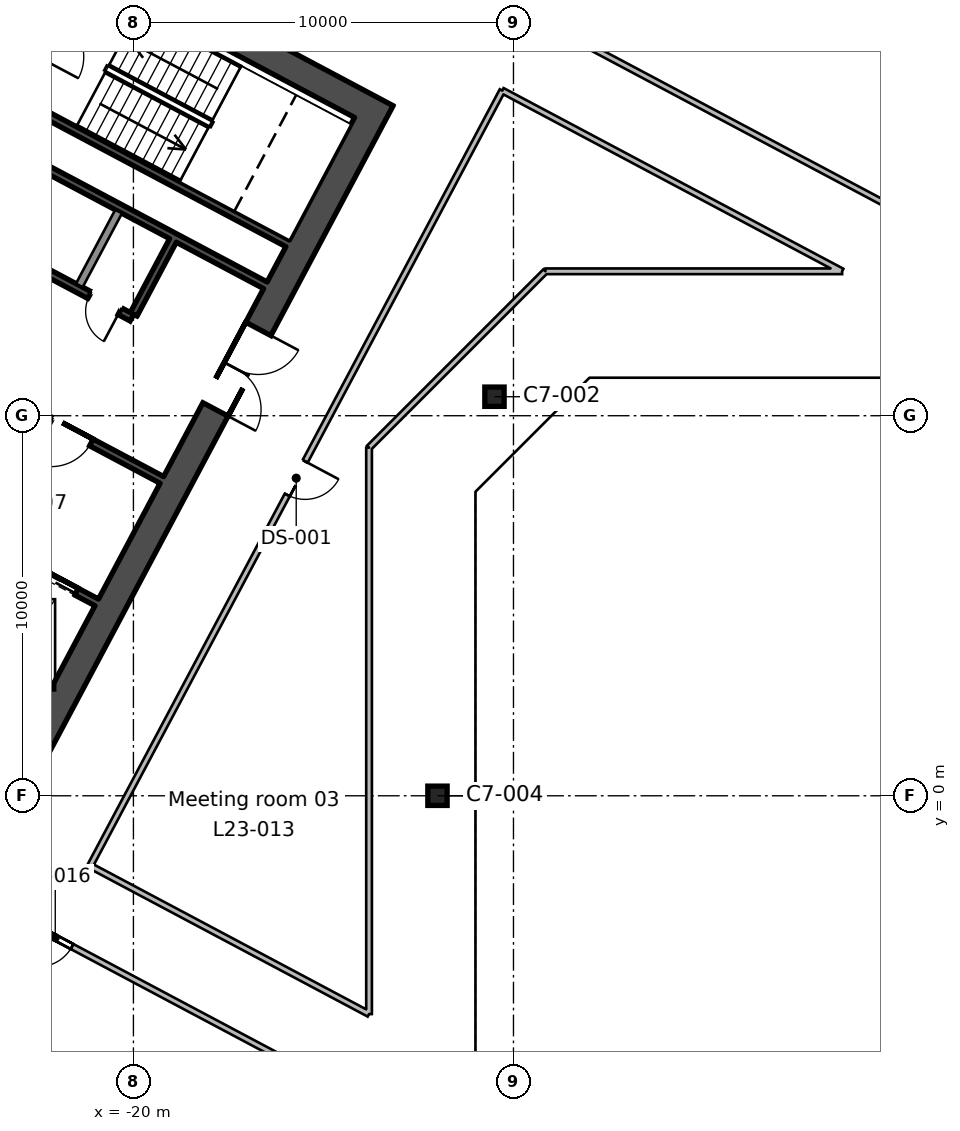
"""IFC4 building model, lengths in metres.
Left out: names, types, materials, properties, quantities, classifications, styles, units other than length and angle.
Written with IfcOpenShell. Run it as: python <this file> out.ifc"""

import sys

from ifc_helpers import new_model, si_unit, direction, frame, frame_2d, origin, origin_2d, place, context, subcontext, project, spatial, rectangle, hollow_rectangle, extrude, element, fill, save


model = new_model("IFC4")
c1 = context("Model", 3, precision=1e-05, world=origin(), true_north=direction((0.0, 1.0)))
c2 = subcontext(c1, "Body", "Model", "MODEL_VIEW")
j1 = project(units=[si_unit("LENGTHUNIT", "METRE"), si_unit("PLANEANGLEUNIT", "RADIAN")], contexts=[c1])
p1 = place(None, origin())
s1 = spatial("IfcSite", under=j1, at=p1, CompositionType="ELEMENT")
p2 = place(p1, origin())
s2 = spatial("IfcBuilding", under=s1, at=p2, CompositionType="ELEMENT")
p3 = place(p2, frame((0.0, 0.0, 118.2)))
s3 = spatial("IfcBuildingStorey", under=s2, at=p3, CompositionType="ELEMENT", Elevation=118.2)
for number, where, z_axis, x_axis in (
    (1, (-12.0, 0.0, 0.0), (0.0, 0.0, 1.0), (1.0, 0.0, 0.0)),
    (2, (-10.5, 10.5, 0.0), (0.0, 0.0, 1.0), (1.0, 0.0, 0.0)),
):
    element("IfcColumn", number, at=place(p3, frame(where, z_axis=z_axis, x_axis=x_axis)), inside=s3, PredefinedType="COLUMN", context=c2, shape_type="SweptSolid", body=[
        extrude(hollow_rectangle(XDim=0.508, YDim=0.508, WallThickness=0.012, InnerFilletRadius=0.006, OuterFilletRadius=0.018, at=origin_2d()), origin(), (0.0, 0.0, 1.0), 4.0),
    ])
p4 = place(p3, frame((-13.498, 18.333, 0.0), z_axis=(0.0, 0.0, 1.0), x_axis=(-0.469469918705, -0.88294846703, 0.0)))
e3 = element("IfcWall", 3, at=p4, inside=s3, PredefinedType="SHEAR", context=c2, shape_type="SweptSolid", body=[
    extrude(rectangle(XDim=19.7, YDim=0.75, at=frame_2d((9.85, 0.0))), origin(), (0.0, 0.0, 1.0), 4.0),
])
p5 = place(p4, frame((6.85, 0.0, 0.0)))
e4 = element("IfcOpeningElement", 4, at=p5, cuts=e3, PredefinedType="OPENING", context=c2, shape_type="SweptSolid", body=[
    extrude(rectangle(XDim=2.4, YDim=2.4, at=frame_2d((1.2, 1.2))), frame((0.0, 0.385, 0.0), z_axis=(0.0, -1.0, 0.0), x_axis=(1.0, 0.0, 0.0)), (0.0, 0.0, 1.0), 0.77),
])
p6 = place(p3, frame((-14.005, 18.178, 0.0), z_axis=(0.0, 0.0, 1.0), x_axis=(-0.88295010195, 0.469466843842, 0.0)))
e5 = element("IfcWall", 5, at=p6, inside=s3, PredefinedType="SHEAR", context=c2, shape_type="SweptSolid", body=[
    extrude(rectangle(XDim=20.2, YDim=0.75, at=frame_2d((10.1, 0.0))), origin(), (0.0, 0.0, 1.0), 4.0),
])
p7 = place(p3, frame((-18.96, 14.611, 0.0), z_axis=(0.0, 0.0, 1.0), x_axis=(-0.4694473164, -0.882960484464, 0.0)))
e6 = element("IfcWall", 6, at=p7, inside=s3, PredefinedType="SHEAR", context=c2, shape_type="SweptSolid", body=[
    extrude(rectangle(XDim=2.2, YDim=0.2, at=frame_2d((1.1, 0.0))), origin(), (0.0, 0.0, 1.0), 4.0),
])
p8 = place(p3, frame((-20.39, 15.372, 0.0), z_axis=(0.0, 0.0, 1.0), x_axis=(-0.4694473164, -0.882960484464, 0.0)))
e7 = element("IfcWall", 7, at=p8, inside=s3, PredefinedType="SOLIDWALL", context=c2, shape_type="SweptSolid", body=[
    extrude(rectangle(XDim=2.2, YDim=0.2, at=frame_2d((1.1, 0.0))), origin(), (0.0, 0.0, 1.0), 4.0),
])
p9 = place(p3, frame((-21.333, 21.649, 0.0), z_axis=(0.0, 0.0, 1.0), x_axis=(-0.469494272526, -0.882935517501, 0.0)))
e8 = element("IfcWall", 8, at=p9, inside=s3, PredefinedType="SHEAR", context=c2, shape_type="SweptSolid", body=[
    extrude(rectangle(XDim=7.3, YDim=0.2, at=frame_2d((3.65, 0.0))), origin(), (0.0, 0.0, 1.0), 4.0),
])
p10 = place(p9, frame((1.3, 0.0, 0.0)))
e9 = element("IfcOpeningElement", 9, at=p10, cuts=e8, PredefinedType="OPENING", context=c2, shape_type="SweptSolid", body=[
    extrude(rectangle(XDim=1.2, YDim=2.1, at=frame_2d((0.6, 1.05))), frame((0.0, 0.11, 0.0), z_axis=(0.0, -1.0, 0.0), x_axis=(1.0, 0.0, 0.0)), (0.0, 0.0, 1.0), 0.22),
])
p11 = place(p3, frame((-15.942, 14.536, 0.0), z_axis=(0.0, 0.0, 1.0), x_axis=(-0.882946947542, 0.469472776449, 0.0)))
e10 = element("IfcWall", 10, at=p11, inside=s3, PredefinedType="SHEAR", context=c2, shape_type="SweptSolid", body=[
    extrude(rectangle(XDim=8.0, YDim=0.2, at=frame_2d((4.0, 0.0))), origin(), (0.0, 0.0, 1.0), 4.0),
])
p12 = place(p3, frame((-16.529, 13.432, 0.0), z_axis=(0.0, 0.0, 1.0), x_axis=(-0.88295287151, 0.469461634952, 0.0)))
e11 = element("IfcWall", 11, at=p12, inside=s3, PredefinedType="SHEAR", context=c2, shape_type="SweptSolid", body=[
    extrude(rectangle(XDim=8.0, YDim=0.2, at=frame_2d((4.0, 0.0))), origin(), (0.0, 0.0, 1.0), 4.0),
])
p13 = place(p3, frame((-20.04, 12.581, 0.0), z_axis=(0.0, 0.0, 1.0), x_axis=(-0.882942972946, 0.469480251476, 0.0)))
e12 = element("IfcWall", 12, at=p13, inside=s3, PredefinedType="SHEAR", context=c2, shape_type="SweptSolid", body=[
    extrude(rectangle(XDim=5.4, YDim=0.2, at=frame_2d((2.7, 0.0))), origin(), (0.0, 0.0, 1.0), 4.0),
])
p14 = place(p13, frame((0.36, 0.0, 0.0)))
e13 = element("IfcOpeningElement", 13, at=p14, cuts=e12, PredefinedType="OPENING", context=c2, shape_type="SweptSolid", body=[
    extrude(rectangle(XDim=0.9, YDim=2.1, at=frame_2d((0.45, 1.05))), frame((0.0, 0.11, 0.0), z_axis=(0.0, -1.0, 0.0), x_axis=(1.0, 0.0, 0.0)), (0.0, 0.0, 1.0), 0.22),
])
p15 = place(p13, frame((3.06, 0.0, 0.0)))
e14 = element("IfcOpeningElement", 14, at=p15, cuts=e12, PredefinedType="OPENING", context=c2, shape_type="SweptSolid", body=[
    extrude(rectangle(XDim=0.9, YDim=2.1, at=frame_2d((0.45, 1.05))), frame((0.0, 0.11, 0.0), z_axis=(0.0, -1.0, 0.0), x_axis=(1.0, 0.0, 0.0)), (0.0, 0.0, 1.0), 0.22),
])
p16 = place(p3, frame((-19.252, 8.311, 0.0), z_axis=(0.0, 0.0, 1.0), x_axis=(-0.882955722218, 0.469456273365, 0.0)))
e15 = element("IfcWall", 15, at=p16, inside=s3, PredefinedType="SHEAR", context=c2, shape_type="SweptSolid", body=[
    extrude(rectangle(XDim=10.0, YDim=0.2, at=frame_2d((5.0, 0.0))), origin(), (0.0, 0.0, 1.0), 4.0),
])
p17 = place(p16, frame((2.1, 0.0, 0.0)))
e16 = element("IfcOpeningElement", 16, at=p17, cuts=e15, PredefinedType="OPENING", context=c2, shape_type="SweptSolid", body=[
    extrude(rectangle(XDim=1.2, YDim=2.1, at=frame_2d((0.6, 1.05))), frame((0.0, 0.11, 0.0), z_axis=(0.0, -1.0, 0.0), x_axis=(1.0, 0.0, 0.0)), (0.0, 0.0, 1.0), 0.22),
])
p18 = place(p3, frame((-20.965, 5.088, 0.0), z_axis=(0.0, 0.0, 1.0), x_axis=(-0.882925986334, 0.469512196493, 0.0)))
e17 = element("IfcWall", 17, at=p18, inside=s3, PredefinedType="SHEAR", context=c2, shape_type="SweptSolid", body=[
    extrude(rectangle(XDim=4.5, YDim=0.2, at=frame_2d((2.25, 0.0))), origin(), (0.0, 0.0, 1.0), 4.0),
])
p19 = place(p18, frame((0.6, 0.0, 0.0)))
e18 = element("IfcOpeningElement", 18, at=p19, cuts=e17, PredefinedType="OPENING", context=c2, shape_type="SweptSolid", body=[
    extrude(rectangle(XDim=1.1, YDim=2.1, at=frame_2d((0.55, 1.05))), frame((0.0, 0.11, 0.0), z_axis=(0.0, -1.0, 0.0), x_axis=(1.0, 0.0, 0.0)), (0.0, 0.0, 1.0), 0.22),
])
p20 = place(p3, frame((-13.8, -8.122, 0.0), z_axis=(0.0, 0.0, 1.0), x_axis=(-0.882950271686, 0.469466524611, 0.0)))
e19 = element("IfcWall", 19, at=p20, inside=s3, PredefinedType="PARTITIONING", context=c2, shape_type="SweptSolid", body=[
    extrude(rectangle(XDim=34.727, YDim=0.15, at=frame_2d((17.363, 0.0))), origin(), (0.0, 0.0, 1.0), 3.64),
])
p21 = place(p20, frame((26.15, 0.0, 0.0)))
e20 = element("IfcOpeningElement", 20, at=p21, cuts=e19, PredefinedType="OPENING", context=c2, shape_type="SweptSolid", body=[
    extrude(rectangle(XDim=1.0, YDim=2.1, at=frame_2d((0.5, 1.05))), frame((0.0, 0.085, 0.0), z_axis=(0.0, -1.0, 0.0), x_axis=(1.0, 0.0, 0.0)), (0.0, 0.0, 1.0), 0.17),
])
p22 = place(p20, frame((16.85, 0.0, 0.0)))
e21 = element("IfcOpeningElement", 21, at=p22, cuts=e19, PredefinedType="OPENING", context=c2, shape_type="SweptSolid", body=[
    extrude(rectangle(XDim=1.0, YDim=2.1, at=frame_2d((0.5, 1.05))), frame((0.0, 0.085, 0.0), z_axis=(0.0, -1.0, 0.0), x_axis=(1.0, 0.0, 0.0)), (0.0, 0.0, 1.0), 0.17),
])
p23 = place(p20, frame((8.851, 0.0, 0.0)))
e22 = element("IfcOpeningElement", 22, at=p23, cuts=e19, PredefinedType="OPENING", context=c2, shape_type="SweptSolid", body=[
    extrude(rectangle(XDim=1.0, YDim=2.1, at=frame_2d((0.5, 1.05))), frame((0.0, 0.085, 0.0), z_axis=(0.0, -1.0, 0.0), x_axis=(1.0, 0.0, 0.0)), (0.0, 0.0, 1.0), 0.17),
])
p24 = place(p3, frame((-32.47, 32.724, 0.0), z_axis=(0.0, 0.0, 1.0), x_axis=(0.88295243426, -0.469462457321, 0.0)))
e23 = element("IfcWall", 23, at=p24, inside=s3, PredefinedType="PARTITIONING", context=c2, shape_type="SweptSolid", body=[
    extrude(rectangle(XDim=36.774, YDim=0.15, at=frame_2d((18.387, 0.0))), origin(), (0.0, 0.0, 1.0), 3.64),
])
p25 = place(p24, frame((17.45, 0.0, 0.0)))
e24 = element("IfcOpeningElement", 24, at=p25, cuts=e23, PredefinedType="OPENING", context=c2, shape_type="SweptSolid", body=[
    extrude(rectangle(XDim=1.8, YDim=2.1, at=frame_2d((0.9, 1.05))), frame((0.0, 0.085, 0.0), z_axis=(0.0, -1.0, 0.0), x_axis=(1.0, 0.0, 0.0)), (0.0, 0.0, 1.0), 0.17),
])
p26 = place(p24, frame((9.15, 0.0, 0.0)))
e25 = element("IfcOpeningElement", 25, at=p26, cuts=e23, PredefinedType="OPENING", context=c2, shape_type="SweptSolid", body=[
    extrude(rectangle(XDim=1.0, YDim=2.1, at=frame_2d((0.5, 1.05))), frame((0.0, 0.085, 0.0), z_axis=(0.0, -1.0, 0.0), x_axis=(1.0, 0.0, 0.0)), (0.0, 0.0, 1.0), 0.17),
])
p27 = place(p3, frame((-21.139, -1.841, 0.0), z_axis=(0.0, 0.0, 1.0), x_axis=(0.46947923089, 0.882943515613, 0.0)))
e26 = element("IfcWall", 26, at=p27, inside=s3, PredefinedType="PARTITIONING", context=c2, shape_type="SweptSolid", body=[
    extrude(rectangle(XDim=23.1, YDim=0.15, at=frame_2d((11.55, 0.0))), origin(), (0.0, 0.0, 1.0), 3.64),
])
p28 = place(p27, frame((11.05, 0.0, 0.0)))
e27 = element("IfcOpeningElement", 27, at=p28, cuts=e26, PredefinedType="OPENING", context=c2, shape_type="SweptSolid", body=[
    extrude(rectangle(XDim=1.0, YDim=2.1, at=frame_2d((0.5, 1.05))), frame((0.0, 0.085, 0.0), z_axis=(0.0, -1.0, 0.0), x_axis=(1.0, 0.0, 0.0)), (0.0, 0.0, 1.0), 0.17),
])
p29 = place(p3, frame((-10.294, 18.555, 0.0), z_axis=(0.0, 0.0, 1.0), x_axis=(0.882931500577, -0.469501826714, 0.0)))
e28 = element("IfcWall", 28, at=p29, inside=s3, PredefinedType="PARTITIONING", context=c2, shape_type="SweptSolid", body=[
    extrude(rectangle(XDim=10.127, YDim=0.15, at=frame_2d((5.064, 0.0))), origin(), (0.0, 0.0, 1.0), 3.64),
])
p30 = place(p3, frame((-1.352, 13.8, 0.0), z_axis=(0.0, 0.0, 1.0), x_axis=(-1.0, 0.0, 0.0)))
e29 = element("IfcWall", 29, at=p30, inside=s3, PredefinedType="PARTITIONING", context=c2, shape_type="SweptSolid", body=[
    extrude(rectangle(XDim=7.808, YDim=0.15, at=frame_2d((3.904, 0.0))), origin(), (0.0, 0.0, 1.0), 3.64),
])
p31 = place(p3, frame((-9.16, 13.8, 0.0), z_axis=(0.0, 0.0, 1.0), x_axis=(-0.707106781187, -0.707106781187, 0.0)))
e30 = element("IfcWall", 30, at=p31, inside=s3, PredefinedType="PARTITIONING", context=c2, shape_type="SweptSolid", body=[
    extrude(rectangle(XDim=6.562, YDim=0.15, at=frame_2d((3.281, 0.0))), origin(), (0.0, 0.0, 1.0), 3.64),
])
p32 = place(p3, frame((-13.8, 9.16, 0.0), z_axis=(0.0, 0.0, 1.0), x_axis=(0.0, -1.0, 0.0)))
e31 = element("IfcWall", 31, at=p32, inside=s3, PredefinedType="PARTITIONING", context=c2, shape_type="SweptSolid", body=[
    extrude(rectangle(XDim=14.904, YDim=0.15, at=frame_2d((7.452, 0.0))), origin(), (0.0, 0.0, 1.0), 3.64),
])
p33 = place(p3, frame((-13.8, -5.744, 0.0), z_axis=(0.0, 0.0, 1.0), x_axis=(-0.882913323819, 0.469536007803, 0.0)))
e32 = element("IfcWall", 32, at=p33, inside=s3, PredefinedType="PARTITIONING", context=c2, shape_type="SweptSolid", body=[
    extrude(rectangle(XDim=8.312, YDim=0.15, at=frame_2d((4.156, 0.0))), origin(), (0.0, 0.0, 1.0), 3.64),
])
p34 = place(p5, origin())
e33 = element("IfcDoor", 33, at=p34, inside=s3, OperationType="DOUBLE_DOOR_SINGLE_SWING", PredefinedType="DOOR", context=c2, shape_type="SweptSolid", body=[
    extrude(rectangle(XDim=2.4, YDim=2.4, at=frame_2d((1.2, 1.2))), frame((0.0, 0.025, 0.0), z_axis=(0.0, -1.0, 0.0), x_axis=(1.0, 0.0, 0.0)), (0.0, 0.0, 1.0), 0.05),
])
fill(e4, e33)
p35 = place(p17, origin())
e34 = element("IfcDoor", 34, at=p35, inside=s3, OperationType="SINGLE_SWING_RIGHT", PredefinedType="DOOR", context=c2, shape_type="SweptSolid", body=[
    extrude(rectangle(XDim=1.2, YDim=2.1, at=frame_2d((0.6, 1.05))), frame((0.0, 0.025, 0.0), z_axis=(0.0, -1.0, 0.0), x_axis=(1.0, 0.0, 0.0)), (0.0, 0.0, 1.0), 0.05),
])
fill(e16, e34)
p36 = place(p10, origin())
e35 = element("IfcDoor", 35, at=p36, inside=s3, OperationType="SINGLE_SWING_RIGHT", PredefinedType="DOOR", context=c2, shape_type="SweptSolid", body=[
    extrude(rectangle(XDim=1.2, YDim=2.1, at=frame_2d((0.6, 1.05))), frame((0.0, 0.025, 0.0), z_axis=(0.0, -1.0, 0.0), x_axis=(1.0, 0.0, 0.0)), (0.0, 0.0, 1.0), 0.05),
])
fill(e9, e35)
p37 = place(p14, origin())
e36 = element("IfcDoor", 36, at=p37, inside=s3, OperationType="SINGLE_SWING_LEFT", PredefinedType="DOOR", context=c2, shape_type="SweptSolid", body=[
    extrude(rectangle(XDim=0.9, YDim=2.1, at=frame_2d((0.45, 1.05))), frame((0.0, 0.025, 0.0), z_axis=(0.0, -1.0, 0.0), x_axis=(1.0, 0.0, 0.0)), (0.0, 0.0, 1.0), 0.05),
])
fill(e13, e36)
p38 = place(p19, origin())
e37 = element("IfcDoor", 37, at=p38, inside=s3, OperationType="DOUBLE_DOOR_SLIDING", PredefinedType="DOOR", context=c2, shape_type="SweptSolid", body=[
    extrude(rectangle(XDim=1.1, YDim=2.1, at=frame_2d((0.55, 1.05))), frame((0.0, 0.025, 0.0), z_axis=(0.0, -1.0, 0.0), x_axis=(1.0, 0.0, 0.0)), (0.0, 0.0, 1.0), 0.05),
])
fill(e18, e37)
p39 = place(p28, frame((1.0, 0.0, 0.0), z_axis=(0.0, 0.0, 1.0), x_axis=(-1.0, 0.0, 0.0)))
e38 = element("IfcDoor", 38, at=p39, inside=s3, OperationType="SINGLE_SWING_LEFT", PredefinedType="DOOR", context=c2, shape_type="SweptSolid", body=[
    extrude(rectangle(XDim=1.0, YDim=2.1, at=frame_2d((0.5, 1.05))), frame((0.0, 0.025, 0.0), z_axis=(0.0, -1.0, 0.0), x_axis=(1.0, 0.0, 0.0)), (0.0, 0.0, 1.0), 0.05),
])
fill(e27, e38)
p40 = place(p23, origin())
e39 = element("IfcDoor", 39, at=p40, inside=s3, OperationType="SINGLE_SWING_RIGHT", PredefinedType="DOOR", context=c2, shape_type="SweptSolid", body=[
    extrude(rectangle(XDim=1.0, YDim=2.1, at=frame_2d((0.5, 1.05))), frame((0.0, 0.025, 0.0), z_axis=(0.0, -1.0, 0.0), x_axis=(1.0, 0.0, 0.0)), (0.0, 0.0, 1.0), 0.05),
])
fill(e22, e39)
save(model, sys.argv[1])
